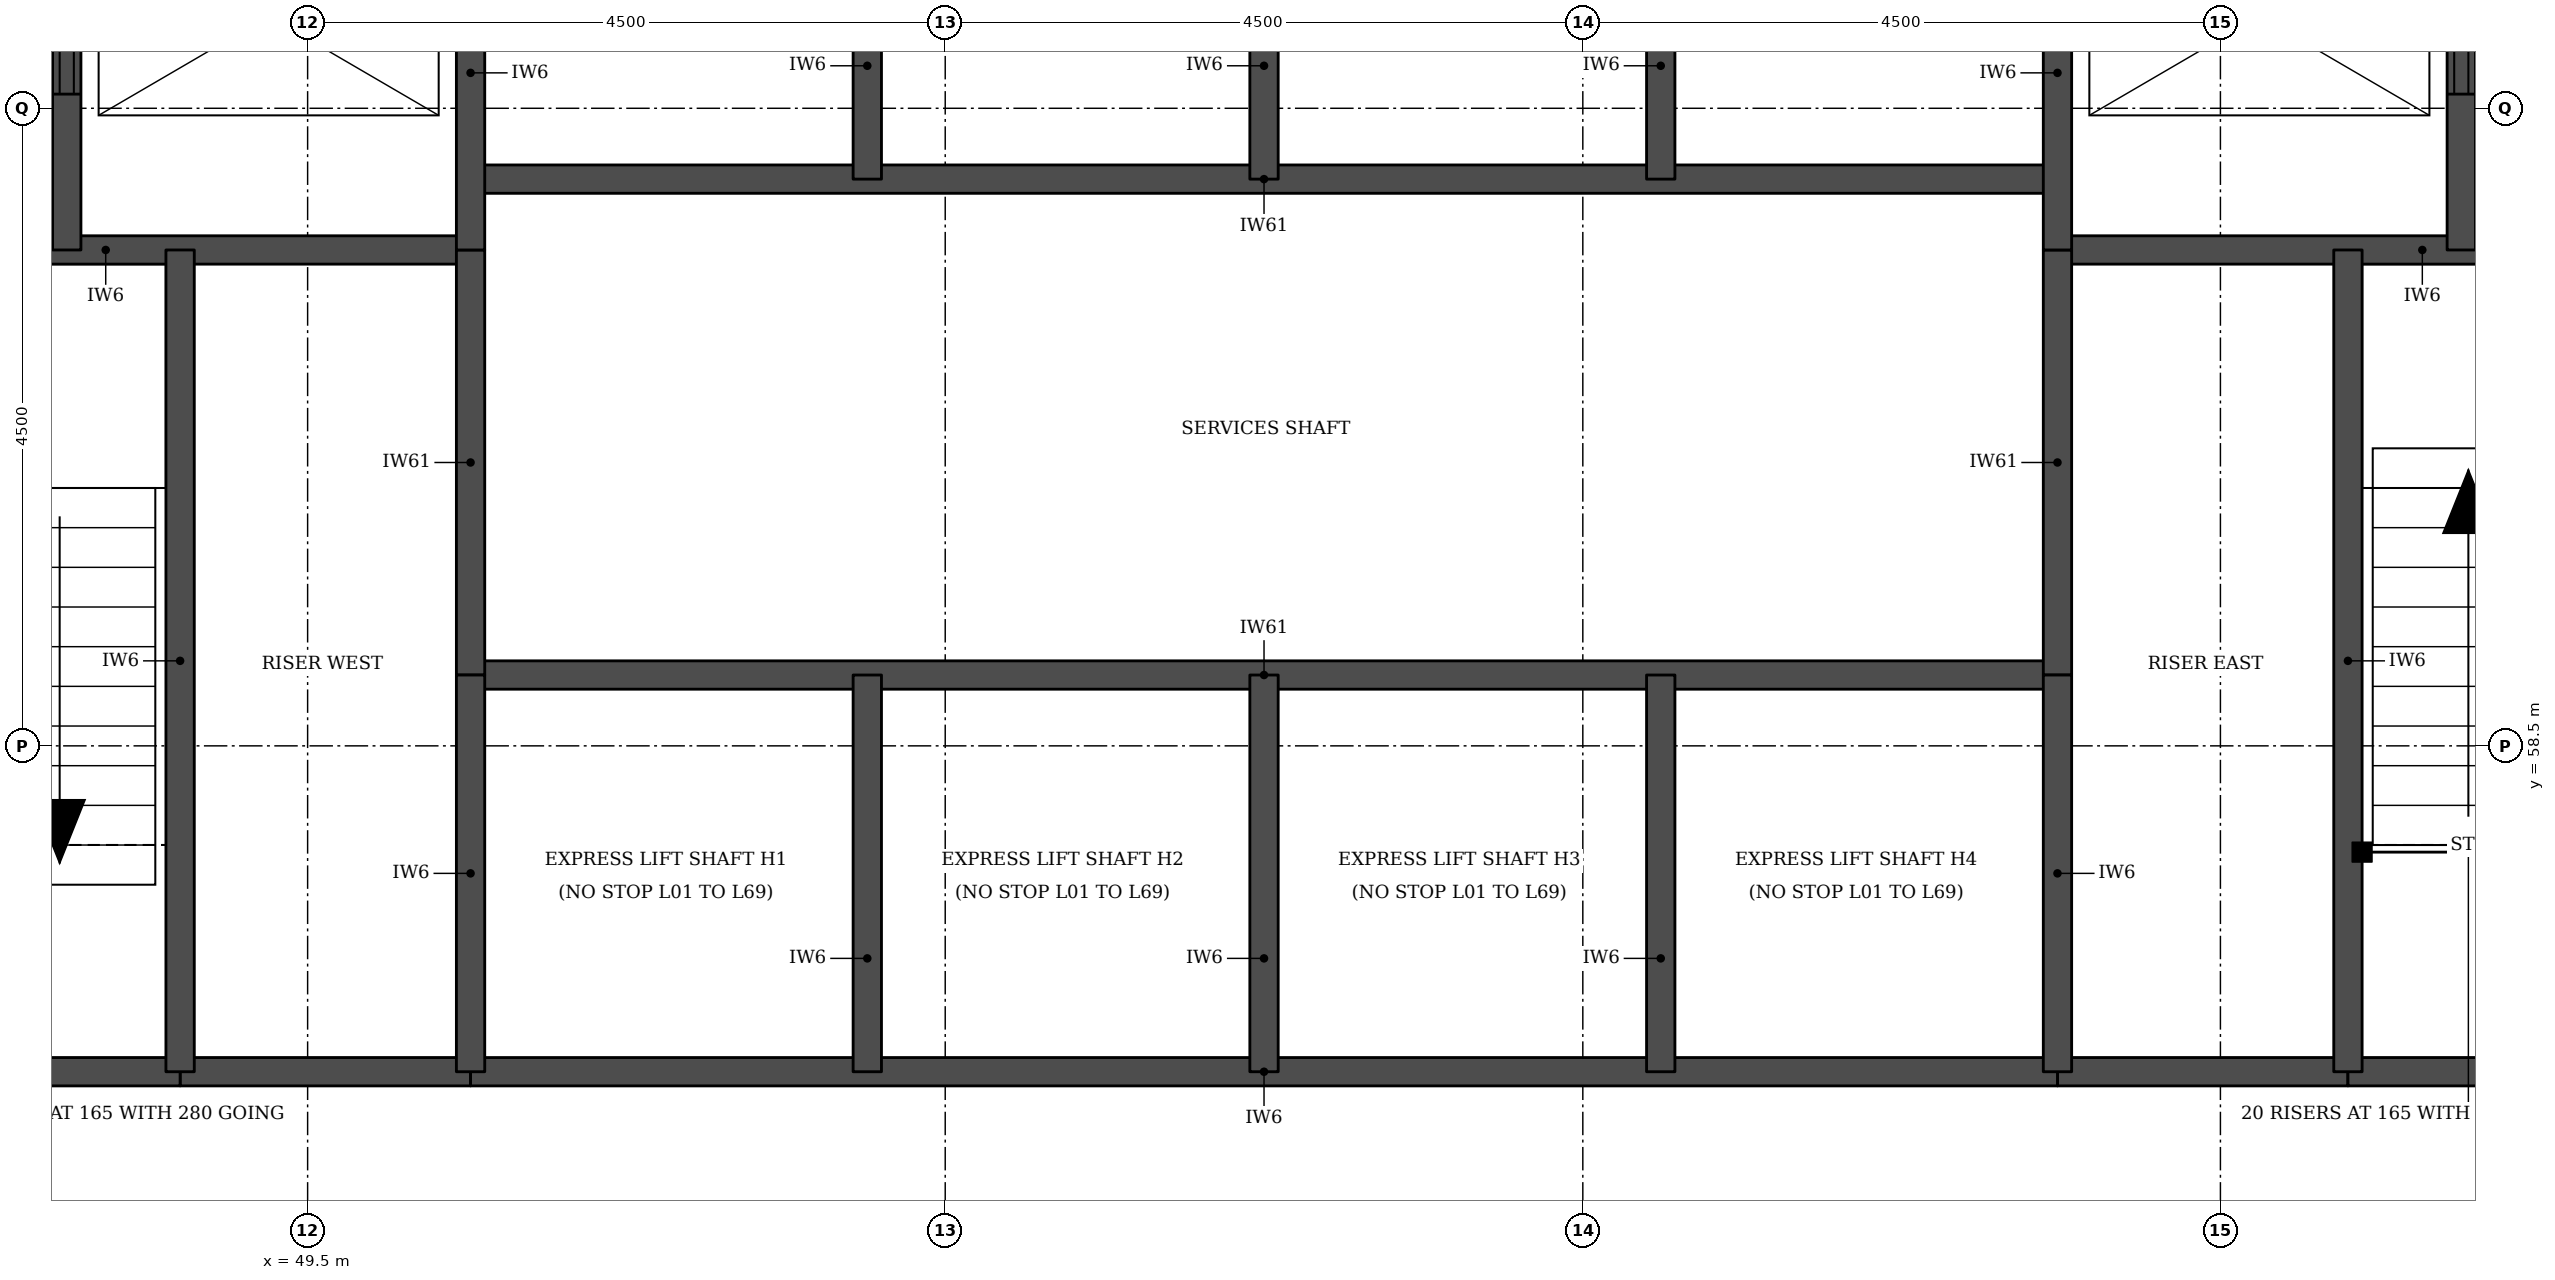
"""IFC4 building model, lengths in metres.
Left out: names, types, materials, properties, quantities, classifications, styles, units other than length and angle.
Written with IfcOpenShell. Run it as: python <this file> out.ifc"""

import sys

from ifc_helpers import new_model, si_unit, direction, frame, frame_2d, origin, place, context, subcontext, project, spatial, rectangle, extrude, element, fill, save


model = new_model("IFC4")
c1 = context("Model", 3, precision=1e-05, world=origin(), true_north=direction((0.0, 1.0)))
c2 = subcontext(c1, "Body", "Model", "MODEL_VIEW")
j1 = project(units=[si_unit("LENGTHUNIT", "METRE"), si_unit("PLANEANGLEUNIT", "RADIAN")], contexts=[c1])
p1 = place(None, origin())
s1 = spatial("IfcSite", under=j1, at=p1, CompositionType="ELEMENT")
p2 = place(p1, origin())
s2 = spatial("IfcBuilding", under=s1, at=p2, CompositionType="ELEMENT")
p3 = place(p2, frame((0.0, 0.0, 66.0)))
s3 = spatial("IfcBuildingStorey", under=s2, at=p3, CompositionType="ELEMENT", Elevation=66.0)
for number, where, z_axis, x_axis in (
    (1, (48.6, 56.2, 0.0), (0.0, 0.0, 1.0), (1.0, 0.0, 0.0)),
    (2, (61.85, 56.2, 0.0), (0.0, 0.0, 1.0), (1.0, 0.0, 0.0)),
):
    element("IfcWall", number, at=place(p3, frame(where, z_axis=z_axis, x_axis=x_axis)), inside=s3, PredefinedType="SOLIDWALL", context=c2, shape_type="SweptSolid", body=[
        extrude(rectangle(XDim=2.05, YDim=0.2, at=frame_2d((1.025, 0.0))), origin(), (0.0, 0.0, 1.0), 3.08),
    ])
p4 = place(p3, frame((45.5, 56.2, 0.0), z_axis=(0.0, 0.0, 1.0), x_axis=(1.0, 0.0, 0.0)))
e3 = element("IfcWall", 3, at=p4, inside=s3, PredefinedType="SOLIDWALL", context=c2, shape_type="SweptSolid", body=[
    extrude(rectangle(XDim=3.1, YDim=0.2, at=frame_2d((1.55, 0.0))), origin(), (0.0, 0.0, 1.0), 3.08),
])
p5 = place(p3, frame((50.65, 56.2, 0.0), z_axis=(0.0, 0.0, 1.0), x_axis=(1.0, 0.0, 0.0)))
e4 = element("IfcWall", 4, at=p5, inside=s3, PredefinedType="SOLIDWALL", context=c2, shape_type="SweptSolid", body=[
    extrude(rectangle(XDim=11.2, YDim=0.2, at=frame_2d((5.6, 0.0))), origin(), (0.0, 0.0, 1.0), 3.08),
])
p6 = place(p3, frame((63.9, 56.2, 0.0), z_axis=(0.0, 0.0, 1.0), x_axis=(1.0, 0.0, 0.0)))
e5 = element("IfcWall", 5, at=p6, inside=s3, PredefinedType="SOLIDWALL", context=c2, shape_type="SweptSolid", body=[
    extrude(rectangle(XDim=3.1, YDim=0.2, at=frame_2d((1.55, 0.0))), origin(), (0.0, 0.0, 1.0), 3.08),
])
p7 = place(p3, frame((50.65, 59.0, 0.0), z_axis=(0.0, 0.0, 1.0), x_axis=(1.0, 0.0, 0.0)))
e6 = element("IfcWall", 6, at=p7, inside=s3, PredefinedType="SOLIDWALL", context=c2, shape_type="SweptSolid", body=[
    extrude(rectangle(XDim=11.2, YDim=0.2, at=frame_2d((5.6, 0.0))), origin(), (0.0, 0.0, 1.0), 3.3),
])
for number, where, z_axis, x_axis in (
    (7, (45.5, 62.0, 0.0), (0.0, 0.0, 1.0), (1.0, 0.0, 0.0)),
    (8, (61.85, 62.0, 0.0), (0.0, 0.0, 1.0), (1.0, 0.0, 0.0)),
):
    element("IfcWall", number, at=place(p3, frame(where, z_axis=z_axis, x_axis=x_axis)), inside=s3, PredefinedType="SOLIDWALL", context=c2, shape_type="SweptSolid", body=[
        extrude(rectangle(XDim=5.15, YDim=0.2, at=frame_2d((2.575, 0.0))), origin(), (0.0, 0.0, 1.0), 3.08),
    ])
p8 = place(p3, frame((50.65, 62.5, 0.0), z_axis=(0.0, 0.0, 1.0), x_axis=(1.0, 0.0, 0.0)))
e9 = element("IfcWall", 9, at=p8, inside=s3, PredefinedType="SOLIDWALL", context=c2, shape_type="SweptSolid", body=[
    extrude(rectangle(XDim=11.2, YDim=0.2, at=frame_2d((5.6, 0.0))), origin(), (0.0, 0.0, 1.0), 3.3),
])
p9 = place(p3, frame((47.8, 62.0, 0.0), z_axis=(0.0, 0.0, 1.0), x_axis=(0.0, 1.0, 0.0)))
e10 = element("IfcWall", 10, at=p9, inside=s3, PredefinedType="SOLIDWALL", context=c2, shape_type="SweptSolid", body=[
    extrude(rectangle(XDim=3.3, YDim=0.2, at=frame_2d((1.65, 0.0))), origin(), (0.0, 0.0, 1.0), 3.08),
])
p10 = place(p9, frame((1.1, 0.0, 0.0)))
e11 = element("IfcOpeningElement", 11, at=p10, cuts=e10, PredefinedType="OPENING", context=c2, shape_type="SweptSolid", body=[
    extrude(rectangle(XDim=1.1, YDim=2.1, at=frame_2d((0.55, 1.05))), frame((0.0, 0.11, 0.0), z_axis=(0.0, -1.0, 0.0), x_axis=(1.0, 0.0, 0.0)), (0.0, 0.0, 1.0), 0.22),
])
p11 = place(p3, frame((48.6, 56.2, 0.0), z_axis=(0.0, 0.0, 1.0), x_axis=(0.0, 1.0, 0.0)))
e12 = element("IfcWall", 12, at=p11, inside=s3, PredefinedType="SOLIDWALL", context=c2, shape_type="SweptSolid", body=[
    extrude(rectangle(XDim=5.8, YDim=0.2, at=frame_2d((2.9, 0.0))), origin(), (0.0, 0.0, 1.0), 3.08),
])
p12 = place(p3, frame((50.65, 59.0, 0.0), z_axis=(0.0, 0.0, 1.0), x_axis=(0.0, 1.0, 0.0)))
e13 = element("IfcWall", 13, at=p12, inside=s3, PredefinedType="SOLIDWALL", context=c2, shape_type="SweptSolid", body=[
    extrude(rectangle(XDim=3.0, YDim=0.2, at=frame_2d((1.5, 0.0))), origin(), (0.0, 0.0, 1.0), 3.3),
])
p13 = place(p3, frame((50.65, 56.2, 0.0), z_axis=(0.0, 0.0, 1.0), x_axis=(0.0, 1.0, 0.0)))
e14 = element("IfcWall", 14, at=p13, inside=s3, PredefinedType="SOLIDWALL", context=c2, shape_type="SweptSolid", body=[
    extrude(rectangle(XDim=2.8, YDim=0.2, at=frame_2d((1.4, 0.0))), origin(), (0.0, 0.0, 1.0), 3.08),
])
p14 = place(p3, frame((50.65, 62.0, 0.0), z_axis=(0.0, 0.0, 1.0), x_axis=(0.0, 1.0, 0.0)))
e15 = element("IfcWall", 15, at=p14, inside=s3, PredefinedType="SOLIDWALL", context=c2, shape_type="SweptSolid", body=[
    extrude(rectangle(XDim=3.3, YDim=0.2, at=frame_2d((1.65, 0.0))), origin(), (0.0, 0.0, 1.0), 3.08),
])
for number, where, z_axis, x_axis in (
    (16, (53.45, 56.2, 0.0), (0.0, 0.0, 1.0), (0.0, 1.0, 0.0)),
    (17, (53.45, 62.5, 0.0), (0.0, 0.0, 1.0), (0.0, 1.0, 0.0)),
    (18, (56.25, 56.2, 0.0), (0.0, 0.0, 1.0), (0.0, 1.0, 0.0)),
    (19, (56.25, 62.5, 0.0), (0.0, 0.0, 1.0), (0.0, 1.0, 0.0)),
    (20, (59.05, 56.2, 0.0), (0.0, 0.0, 1.0), (0.0, 1.0, 0.0)),
    (21, (59.05, 62.5, 0.0), (0.0, 0.0, 1.0), (0.0, 1.0, 0.0)),
):
    element("IfcWall", number, at=place(p3, frame(where, z_axis=z_axis, x_axis=x_axis)), inside=s3, PredefinedType="SOLIDWALL", context=c2, shape_type="SweptSolid", body=[
        extrude(rectangle(XDim=2.8, YDim=0.2, at=frame_2d((1.4, 0.0))), origin(), (0.0, 0.0, 1.0), 3.08),
    ])
p15 = place(p3, frame((61.85, 59.0, 0.0), z_axis=(0.0, 0.0, 1.0), x_axis=(0.0, 1.0, 0.0)))
e22 = element("IfcWall", 22, at=p15, inside=s3, PredefinedType="SOLIDWALL", context=c2, shape_type="SweptSolid", body=[
    extrude(rectangle(XDim=3.0, YDim=0.2, at=frame_2d((1.5, 0.0))), origin(), (0.0, 0.0, 1.0), 3.3),
])
p16 = place(p3, frame((61.85, 56.2, 0.0), z_axis=(0.0, 0.0, 1.0), x_axis=(0.0, 1.0, 0.0)))
e23 = element("IfcWall", 23, at=p16, inside=s3, PredefinedType="SOLIDWALL", context=c2, shape_type="SweptSolid", body=[
    extrude(rectangle(XDim=2.8, YDim=0.2, at=frame_2d((1.4, 0.0))), origin(), (0.0, 0.0, 1.0), 3.08),
])
p17 = place(p3, frame((61.85, 62.0, 0.0), z_axis=(0.0, 0.0, 1.0), x_axis=(0.0, 1.0, 0.0)))
e24 = element("IfcWall", 24, at=p17, inside=s3, PredefinedType="SOLIDWALL", context=c2, shape_type="SweptSolid", body=[
    extrude(rectangle(XDim=3.3, YDim=0.2, at=frame_2d((1.65, 0.0))), origin(), (0.0, 0.0, 1.0), 3.08),
])
p18 = place(p3, frame((63.9, 56.2, 0.0), z_axis=(0.0, 0.0, 1.0), x_axis=(0.0, 1.0, 0.0)))
e25 = element("IfcWall", 25, at=p18, inside=s3, PredefinedType="SOLIDWALL", context=c2, shape_type="SweptSolid", body=[
    extrude(rectangle(XDim=5.8, YDim=0.2, at=frame_2d((2.9, 0.0))), origin(), (0.0, 0.0, 1.0), 3.08),
])
p19 = place(p3, frame((64.7, 62.0, 0.0), z_axis=(0.0, 0.0, 1.0), x_axis=(0.0, 1.0, 0.0)))
e26 = element("IfcWall", 26, at=p19, inside=s3, PredefinedType="SOLIDWALL", context=c2, shape_type="SweptSolid", body=[
    extrude(rectangle(XDim=3.3, YDim=0.2, at=frame_2d((1.65, 0.0))), origin(), (0.0, 0.0, 1.0), 3.08),
])
p20 = place(p19, frame((1.1, 0.0, 0.0)))
e27 = element("IfcOpeningElement", 27, at=p20, cuts=e26, PredefinedType="OPENING", context=c2, shape_type="SweptSolid", body=[
    extrude(rectangle(XDim=1.1, YDim=2.1, at=frame_2d((0.55, 1.05))), frame((0.0, 0.11, 0.0), z_axis=(0.0, -1.0, 0.0), x_axis=(1.0, 0.0, 0.0)), (0.0, 0.0, 1.0), 0.22),
])
p21 = place(p10, origin())
e28 = element("IfcDoor", 28, at=p21, inside=s3, OperationType="DOUBLE_DOOR_SLIDING", PredefinedType="DOOR", context=c2, shape_type="SweptSolid", body=[
    extrude(rectangle(XDim=1.1, YDim=2.1, at=frame_2d((0.55, 1.05))), frame((0.0, 0.025, 0.0), z_axis=(0.0, -1.0, 0.0), x_axis=(1.0, 0.0, 0.0)), (0.0, 0.0, 1.0), 0.05),
])
fill(e11, e28)
p22 = place(p20, origin())
e29 = element("IfcDoor", 29, at=p22, inside=s3, OperationType="DOUBLE_DOOR_SLIDING", PredefinedType="DOOR", context=c2, shape_type="SweptSolid", body=[
    extrude(rectangle(XDim=1.1, YDim=2.1, at=frame_2d((0.55, 1.05))), frame((0.0, 0.025, 0.0), z_axis=(0.0, -1.0, 0.0), x_axis=(1.0, 0.0, 0.0)), (0.0, 0.0, 1.0), 0.05),
])
fill(e27, e29)
save(model, sys.argv[1])
